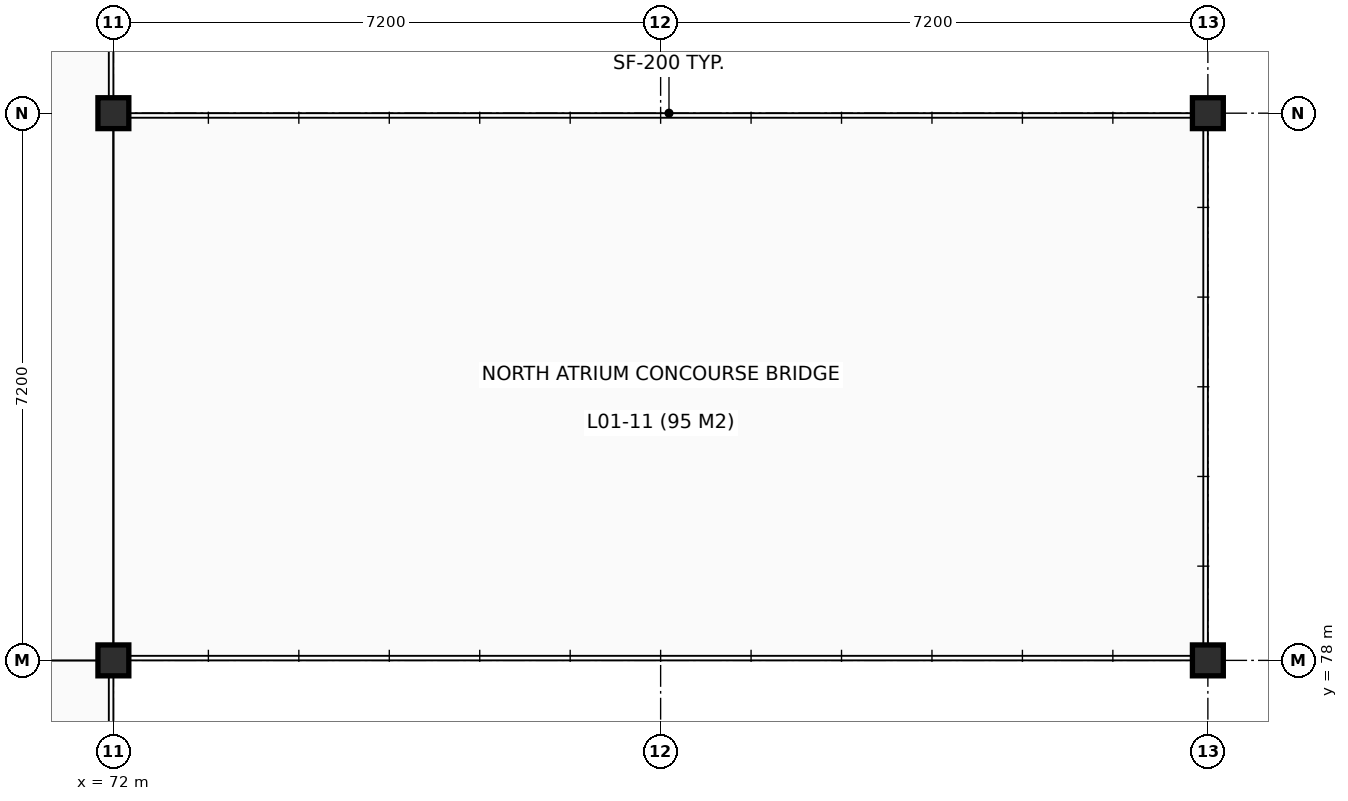
"""IFC4 building model, lengths in metres.
Left out: names, types, materials, properties, quantities, classifications, styles, units other than length and angle.
Written with IfcOpenShell. Run it as: python <this file> out.ifc"""

import sys

from ifc_helpers import new_model, si_unit, direction, frame, origin, origin_2d, place, context, subcontext, project, spatial, hollow_circle, extrude, element, save


model = new_model("IFC4")
c1 = context("Model", 3, precision=1e-05, world=origin(), true_north=direction((0.0, 1.0)))
c2 = subcontext(c1, "Body", "Model", "MODEL_VIEW")
j1 = project(units=[si_unit("LENGTHUNIT", "METRE"), si_unit("PLANEANGLEUNIT", "RADIAN")], contexts=[c1])
p1 = place(None, origin())
s1 = spatial("IfcSite", under=j1, at=p1, CompositionType="ELEMENT")
p2 = place(p1, origin())
s2 = spatial("IfcBuilding", under=s1, at=p2, CompositionType="ELEMENT")
p3 = place(p2, frame((0.0, 0.0, 4.8)))
s3 = spatial("IfcBuildingStorey", under=s2, at=p3, CompositionType="ELEMENT", Elevation=4.8)
for number, where, z_axis, x_axis in (
    (1, (72.0, 78.0, 0.0), (0.0, 0.0, 1.0), (1.0, 0.0, 0.0)),
    (2, (72.0, 85.2, 0.0), (0.0, 0.0, 1.0), (1.0, 0.0, 0.0)),
    (3, (86.4, 78.0, 0.0), (0.0, 0.0, 1.0), (1.0, 0.0, 0.0)),
    (4, (86.4, 85.2, 0.0), (0.0, 0.0, 1.0), (1.0, 0.0, 0.0)),
):
    element("IfcColumn", number, at=place(p3, frame(where, z_axis=z_axis, x_axis=x_axis)), inside=s3, PredefinedType="COLUMN", context=c2, shape_type="SweptSolid", body=[
        extrude(hollow_circle(Radius=0.203, WallThickness=0.016, at=origin_2d()), origin(), (0.0, 0.0, 1.0), 4.8),
    ])
save(model, sys.argv[1])
